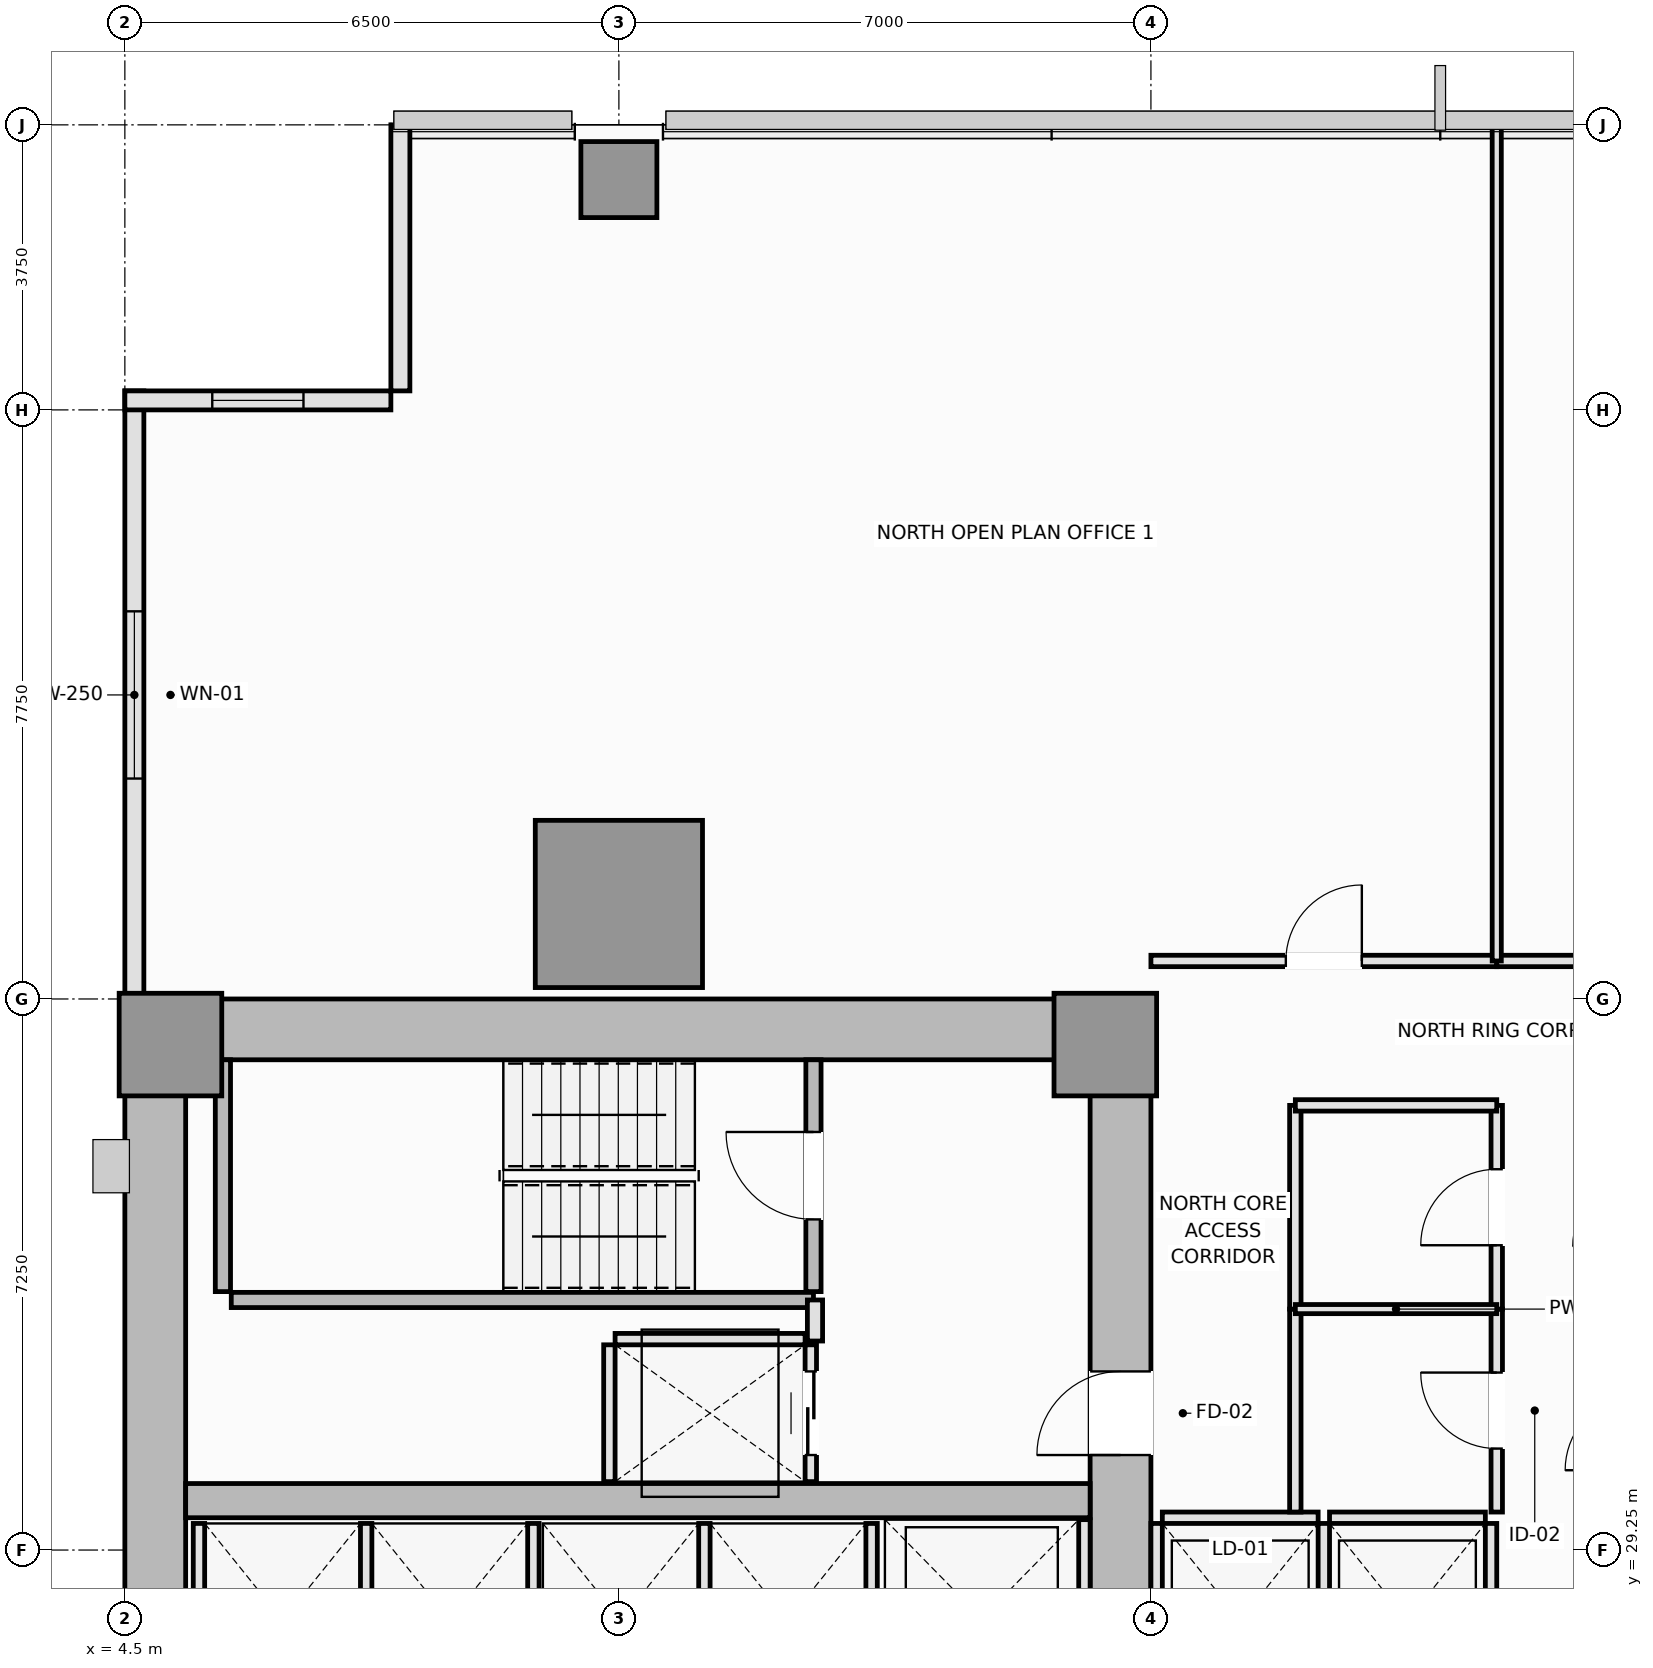
"""IFC4 building model, lengths in metres.
Left out: names, types, materials, properties, quantities, classifications, styles, units other than length and angle.
Written with IfcOpenShell. Run it as: python <this file> out.ifc"""

import sys

from ifc_helpers import new_model, si_unit, direction, frame, frame_2d, origin, origin_2d, place, context, subcontext, project, spatial, rectangle, extrude, element, fill, save


model = new_model("IFC4")
c1 = context("Model", 3, precision=1e-05, world=origin(), true_north=direction((0.0, 1.0)))
c2 = subcontext(c1, "Body", "Model", "MODEL_VIEW")
j1 = project(units=[si_unit("LENGTHUNIT", "METRE"), si_unit("PLANEANGLEUNIT", "RADIAN")], contexts=[c1])
p1 = place(None, origin())
s1 = spatial("IfcSite", under=j1, at=p1, CompositionType="ELEMENT")
p2 = place(p1, origin())
s2 = spatial("IfcBuilding", under=s1, at=p2, CompositionType="ELEMENT")
p3 = place(p2, frame((0.0, 0.0, 89.5)))
s3 = spatial("IfcBuildingStorey", under=s2, at=p3, CompositionType="ELEMENT", Elevation=89.5)
p4 = place(p3, frame((4.5, 36.1, 0.0), z_axis=(0.0, 0.0, 1.0), x_axis=(1.0, 0.0, 0.0)))
e1 = element("IfcWall", 1, at=p4, inside=s3, PredefinedType="SHEAR", context=c2, shape_type="SweptSolid", body=[
    extrude(rectangle(XDim=13.5, YDim=0.8, at=frame_2d((6.75, 0.0))), origin(), (0.0, 0.0, 1.0), 3.55),
])
p5 = place(p3, frame((4.9, 14.8, 0.0), z_axis=(0.0, 0.0, 1.0), x_axis=(0.0, 1.0, 0.0)))
e2 = element("IfcWall", 2, at=p5, inside=s3, PredefinedType="SHEAR", context=c2, shape_type="SweptSolid", body=[
    extrude(rectangle(XDim=20.9, YDim=0.8, at=frame_2d((10.45, 0.0))), origin(), (0.0, 0.0, 1.0), 3.55),
])
p6 = place(p3, frame((17.6, 27.05, 0.0), z_axis=(0.0, 0.0, 1.0), x_axis=(0.0, 1.0, 0.0)))
e3 = element("IfcWall", 3, at=p6, inside=s3, PredefinedType="SHEAR", context=c2, shape_type="SweptSolid", body=[
    extrude(rectangle(XDim=8.65, YDim=0.8, at=frame_2d((4.325, 0.0))), origin(), (0.0, 0.0, 1.0), 3.55),
])
p7 = place(p6, frame((3.45, 0.0, 0.0)))
e4 = element("IfcOpeningElement", 4, at=p7, cuts=e3, PredefinedType="OPENING", context=c2, shape_type="SweptSolid", body=[
    extrude(rectangle(XDim=1.1, YDim=2.15, at=frame_2d((0.55, 1.075))), frame((0.0, 0.41, 0.0), z_axis=(0.0, -1.0, 0.0), x_axis=(1.0, 0.0, 0.0)), (0.0, 0.0, 1.0), 0.82),
])
p8 = place(p3, frame((5.3, 29.9, 0.0), z_axis=(0.0, 0.0, 1.0), x_axis=(1.0, 0.0, 0.0)))
e5 = element("IfcWall", 5, at=p8, inside=s3, PredefinedType="SHEAR", context=c2, shape_type="SweptSolid", body=[
    extrude(rectangle(XDim=11.9, YDim=0.45, at=frame_2d((5.95, 0.0))), origin(), (0.0, 0.0, 1.0), 3.55),
])
for number, where, z_axis, x_axis in (
    (6, (5.1, 35.9, 0.0), (0.0, 0.0, 1.0), (1.0, 0.0, 0.0)),
    (7, (17.4, 35.9, 0.0), (0.0, 0.0, 1.0), (1.0, 0.0, 0.0)),
):
    element("IfcColumn", number, at=place(p3, frame(where, z_axis=z_axis, x_axis=x_axis)), inside=s3, PredefinedType="PILASTER", context=c2, shape_type="SweptSolid", body=[
        extrude(rectangle(XDim=1.35, YDim=1.35, at=origin_2d()), origin(), (0.0, 0.0, 1.0), 3.55),
    ])
p9 = place(p3, frame((11.0, 37.75, 0.0), z_axis=(0.0, 0.0, 1.0), x_axis=(1.0, 0.0, 0.0)))
e8 = element("IfcColumn", 8, at=p9, inside=s3, PredefinedType="COLUMN", context=c2, shape_type="SweptSolid", body=[
    extrude(rectangle(XDim=2.2, YDim=2.2, at=origin_2d()), origin(), (0.0, 0.0, 1.0), 3.55),
])
p10 = place(p3, frame((11.0, 47.28, 0.0), z_axis=(0.0, 0.0, 1.0), x_axis=(1.0, 0.0, 0.0)))
e9 = element("IfcColumn", 9, at=p10, inside=s3, PredefinedType="COLUMN", context=c2, shape_type="SweptSolid", body=[
    extrude(rectangle(XDim=1.0, YDim=1.0, at=origin_2d()), origin(), (0.0, 0.0, 1.0), 3.55),
])
p11 = place(p3, frame((4.625, 44.5, 0.0), z_axis=(0.0, 0.0, 1.0), x_axis=(0.0, -1.0, 0.0)))
e10 = element("IfcWall", 10, at=p11, inside=s3, PredefinedType="SOLIDWALL", context=c2, shape_type="SweptSolid", body=[
    extrude(rectangle(XDim=8.0, YDim=0.25, at=frame_2d((4.0, 0.0))), origin(), (0.0, 0.0, 1.0), 3.35),
])
p12 = place(p11, frame((2.9, 0.0, 0.9)))
e11 = element("IfcOpeningElement", 11, at=p12, cuts=e10, PredefinedType="OPENING", context=c2, shape_type="SweptSolid", body=[
    extrude(rectangle(XDim=2.2, YDim=1.8, at=frame_2d((1.1, 0.9))), frame((0.0, 0.135, 0.0), z_axis=(0.0, -1.0, 0.0), x_axis=(1.0, 0.0, 0.0)), (0.0, 0.0, 1.0), 0.27),
])
p13 = place(p3, frame((8.125, 48.0, 0.0), z_axis=(0.0, 0.0, 1.0), x_axis=(0.0, -1.0, 0.0)))
e12 = element("IfcWall", 12, at=p13, inside=s3, PredefinedType="SOLIDWALL", context=c2, shape_type="SweptSolid", body=[
    extrude(rectangle(XDim=3.5, YDim=0.25, at=frame_2d((1.75, 0.0))), origin(), (0.0, 0.0, 1.0), 3.35),
])
p14 = place(p3, frame((8.0, 44.375, 0.0), z_axis=(0.0, 0.0, 1.0), x_axis=(-1.0, 0.0, 0.0)))
e13 = element("IfcWall", 13, at=p14, inside=s3, PredefinedType="SOLIDWALL", context=c2, shape_type="SweptSolid", body=[
    extrude(rectangle(XDim=3.5, YDim=0.25, at=frame_2d((1.75, 0.0))), origin(), (0.0, 0.0, 1.0), 3.35),
])
p15 = place(p14, frame((1.15, 0.0, 0.9)))
e14 = element("IfcOpeningElement", 14, at=p15, cuts=e13, PredefinedType="OPENING", context=c2, shape_type="SweptSolid", body=[
    extrude(rectangle(XDim=1.2, YDim=1.8, at=frame_2d((0.6, 0.9))), frame((0.0, 0.135, 0.0), z_axis=(0.0, -1.0, 0.0), x_axis=(1.0, 0.0, 0.0)), (0.0, 0.0, 1.0), 0.27),
])
p16 = place(p3, frame((5.79, 32.65, 0.0), z_axis=(0.0, 0.0, 1.0), x_axis=(0.0, 1.0, 0.0)))
e15 = element("IfcWall", 15, at=p16, inside=s3, PredefinedType="SOLIDWALL", context=c2, shape_type="SweptSolid", body=[
    extrude(rectangle(XDim=3.05, YDim=0.2, at=frame_2d((1.525, 0.0))), origin(), (0.0, 0.0, 1.0), 3.55),
])
p17 = place(p3, frame((5.9, 32.54, 0.0), z_axis=(0.0, 0.0, 1.0), x_axis=(1.0, 0.0, 0.0)))
e16 = element("IfcWall", 16, at=p17, inside=s3, PredefinedType="SOLIDWALL", context=c2, shape_type="SweptSolid", body=[
    extrude(rectangle(XDim=7.66, YDim=0.2, at=frame_2d((3.83, 0.0))), origin(), (0.0, 0.0, 1.0), 3.55),
])
p18 = place(p3, frame((13.56, 32.65, 0.0), z_axis=(0.0, 0.0, 1.0), x_axis=(0.0, 1.0, 0.0)))
e17 = element("IfcWall", 17, at=p18, inside=s3, PredefinedType="SOLIDWALL", context=c2, shape_type="SweptSolid", body=[
    extrude(rectangle(XDim=3.05, YDim=0.2, at=frame_2d((1.525, 0.0))), origin(), (0.0, 0.0, 1.0), 3.55),
])
p19 = place(p18, frame((0.95, 0.0, 0.0)))
e18 = element("IfcOpeningElement", 18, at=p19, cuts=e17, PredefinedType="OPENING", context=c2, shape_type="SweptSolid", body=[
    extrude(rectangle(XDim=1.15, YDim=2.15, at=frame_2d((0.575, 1.075))), frame((0.0, 0.11, 0.0), z_axis=(0.0, -1.0, 0.0), x_axis=(1.0, 0.0, 0.0)), (0.0, 0.0, 1.0), 0.22),
])
p20 = place(p3, frame((18.15, 29.675, 0.0), z_axis=(0.0, 0.0, 1.0), x_axis=(1.0, 0.0, 0.0)))
e19 = element("IfcWall", 19, at=p20, inside=s3, PredefinedType="PARTITIONING", context=c2, shape_type="SweptSolid", body=[
    extrude(rectangle(XDim=2.05, YDim=0.15, at=frame_2d((1.025, 0.0))), origin(), (0.0, 0.0, 1.0), 3.35),
])
for number, where, z_axis, x_axis in (
    (20, (18.075, 27.05, 0.0), (0.0, 0.0, 1.0), (0.0, 1.0, 0.0)),
    (21, (20.275, 27.05, 0.0), (0.0, 0.0, 1.0), (0.0, 1.0, 0.0)),
):
    element("IfcWall", number, at=place(p3, frame(where, z_axis=z_axis, x_axis=x_axis)), inside=s3, PredefinedType="PARTITIONING", context=c2, shape_type="SweptSolid", body=[
        extrude(rectangle(XDim=2.55, YDim=0.15, at=frame_2d((1.275, 0.0))), origin(), (0.0, 0.0, 1.0), 3.35),
    ])
p21 = place(p3, frame((20.35, 29.675, 0.0), z_axis=(0.0, 0.0, 1.0), x_axis=(1.0, 0.0, 0.0)))
e22 = element("IfcWall", 22, at=p21, inside=s3, PredefinedType="PARTITIONING", context=c2, shape_type="SweptSolid", body=[
    extrude(rectangle(XDim=2.05, YDim=0.15, at=frame_2d((1.025, 0.0))), origin(), (0.0, 0.0, 1.0), 3.35),
])
for number, where, z_axis, x_axis in (
    (23, (22.475, 27.05, 0.0), (0.0, 0.0, 1.0), (0.0, 1.0, 0.0)),
    (24, (5.475, 27.05, 0.0), (0.0, 0.0, 1.0), (0.0, 1.0, 0.0)),
    (25, (7.675, 27.05, 0.0), (0.0, 0.0, 1.0), (0.0, 1.0, 0.0)),
    (26, (9.875, 27.05, 0.0), (0.0, 0.0, 1.0), (0.0, 1.0, 0.0)),
    (27, (12.125, 27.05, 0.0), (0.0, 0.0, 1.0), (0.0, 1.0, 0.0)),
    (28, (14.325, 27.05, 0.0), (0.0, 0.0, 1.0), (0.0, 1.0, 0.0)),
):
    element("IfcWall", number, at=place(p3, frame(where, z_axis=z_axis, x_axis=x_axis)), inside=s3, PredefinedType="PARTITIONING", context=c2, shape_type="SweptSolid", body=[
        extrude(rectangle(XDim=2.55, YDim=0.15, at=frame_2d((1.275, 0.0))), origin(), (0.0, 0.0, 1.0), 3.35),
    ])
p22 = place(p3, frame((17.125, 27.05, 0.0), z_axis=(0.0, 0.0, 1.0), x_axis=(0.0, 1.0, 0.0)))
e29 = element("IfcWall", 29, at=p22, inside=s3, PredefinedType="PARTITIONING", context=c2, shape_type="SweptSolid", body=[
    extrude(rectangle(XDim=2.6, YDim=0.15, at=frame_2d((1.3, 0.0))), origin(), (0.0, 0.0, 1.0), 3.35),
])
p23 = place(p3, frame((10.95, 32.025, 0.0), z_axis=(0.0, 0.0, 1.0), x_axis=(1.0, 0.0, 0.0)))
e30 = element("IfcWall", 30, at=p23, inside=s3, PredefinedType="PARTITIONING", context=c2, shape_type="SweptSolid", body=[
    extrude(rectangle(XDim=2.5, YDim=0.15, at=frame_2d((1.25, 0.0))), origin(), (0.0, 0.0, 1.0), 3.35),
])
p24 = place(p3, frame((10.875, 30.15, 0.0), z_axis=(0.0, 0.0, 1.0), x_axis=(0.0, 1.0, 0.0)))
e31 = element("IfcWall", 31, at=p24, inside=s3, PredefinedType="PARTITIONING", context=c2, shape_type="SweptSolid", body=[
    extrude(rectangle(XDim=1.8, YDim=0.15, at=frame_2d((0.9, 0.0))), origin(), (0.0, 0.0, 1.0), 3.35),
])
p25 = place(p3, frame((13.525, 30.15, 0.0), z_axis=(0.0, 0.0, 1.0), x_axis=(0.0, 1.0, 0.0)))
e32 = element("IfcWall", 32, at=p25, inside=s3, PredefinedType="PARTITIONING", context=c2, shape_type="SweptSolid", body=[
    extrude(rectangle(XDim=1.8, YDim=0.15, at=frame_2d((0.9, 0.0))), origin(), (0.0, 0.0, 1.0), 3.35),
])
p26 = place(p25, frame((0.35, 0.0, 0.0)))
e33 = element("IfcOpeningElement", 33, at=p26, cuts=e32, PredefinedType="OPENING", context=c2, shape_type="SweptSolid", body=[
    extrude(rectangle(XDim=1.1, YDim=2.2, at=frame_2d((0.55, 1.1))), frame((0.0, 0.085, 0.0), z_axis=(0.0, -1.0, 0.0), x_axis=(1.0, 0.0, 0.0)), (0.0, 0.0, 1.0), 0.17),
])
p27 = place(p3, frame((13.58, 32.0, 0.0), z_axis=(0.0, 0.0, 1.0), x_axis=(0.0, 1.0, 0.0)))
e34 = element("IfcWall", 34, at=p27, inside=s3, PredefinedType="PARTITIONING", context=c2, shape_type="SweptSolid", body=[
    extrude(rectangle(XDim=0.54, YDim=0.2, at=frame_2d((0.27, 0.0))), origin(), (0.0, 0.0, 1.0), 3.35),
])
p28 = place(p3, frame((22.55, 29.75, 0.0), z_axis=(0.0, 0.0, 1.0), x_axis=(0.0, 1.0, 0.0)))
e35 = element("IfcWall", 35, at=p28, inside=s3, PredefinedType="PARTITIONING", context=c2, shape_type="SweptSolid", body=[
    extrude(rectangle(XDim=2.67, YDim=0.15, at=frame_2d((1.335, 0.0))), origin(), (0.0, 0.0, 1.0), 2.99),
])
p29 = place(p28, frame((0.835, 0.0, 0.0)))
e36 = element("IfcOpeningElement", 36, at=p29, cuts=e35, PredefinedType="OPENING", context=c2, shape_type="SweptSolid", body=[
    extrude(rectangle(XDim=1.0, YDim=2.15, at=frame_2d((0.5, 1.075))), frame((0.0, 0.085, 0.0), z_axis=(0.0, -1.0, 0.0), x_axis=(1.0, 0.0, 0.0)), (0.0, 0.0, 1.0), 0.17),
])
p30 = place(p3, frame((22.55, 32.42, 0.0), z_axis=(0.0, 0.0, 1.0), x_axis=(0.0, 1.0, 0.0)))
e37 = element("IfcWall", 37, at=p30, inside=s3, PredefinedType="PARTITIONING", context=c2, shape_type="SweptSolid", body=[
    extrude(rectangle(XDim=2.68, YDim=0.15, at=frame_2d((1.34, 0.0))), origin(), (0.0, 0.0, 1.0), 2.99),
])
p31 = place(p30, frame((0.84, 0.0, 0.0)))
e38 = element("IfcOpeningElement", 38, at=p31, cuts=e37, PredefinedType="OPENING", context=c2, shape_type="SweptSolid", body=[
    extrude(rectangle(XDim=1.0, YDim=2.15, at=frame_2d((0.5, 1.075))), frame((0.0, 0.085, 0.0), z_axis=(0.0, -1.0, 0.0), x_axis=(1.0, 0.0, 0.0)), (0.0, 0.0, 1.0), 0.17),
])
p32 = place(p3, frame((19.9, 29.75, 0.0), z_axis=(0.0, 0.0, 1.0), x_axis=(0.0, 1.0, 0.0)))
e39 = element("IfcWall", 39, at=p32, inside=s3, PredefinedType="PARTITIONING", context=c2, shape_type="SweptSolid", body=[
    extrude(rectangle(XDim=2.67, YDim=0.15, at=frame_2d((1.335, 0.0))), origin(), (0.0, 0.0, 1.0), 3.35),
])
p33 = place(p3, frame((19.9, 32.42, 0.0), z_axis=(0.0, 0.0, 1.0), x_axis=(0.0, 1.0, 0.0)))
e40 = element("IfcWall", 40, at=p33, inside=s3, PredefinedType="PARTITIONING", context=c2, shape_type="SweptSolid", body=[
    extrude(rectangle(XDim=2.68, YDim=0.15, at=frame_2d((1.34, 0.0))), origin(), (0.0, 0.0, 1.0), 3.35),
])
p34 = place(p3, frame((19.9, 35.1, 0.0), z_axis=(0.0, 0.0, 1.0), x_axis=(1.0, 0.0, 0.0)))
e41 = element("IfcWall", 41, at=p34, inside=s3, PredefinedType="PARTITIONING", context=c2, shape_type="SweptSolid", body=[
    extrude(rectangle(XDim=2.65, YDim=0.15, at=frame_2d((1.325, 0.0))), origin(), (0.0, 0.0, 1.0), 3.35),
])
p35 = place(p3, frame((18.0, 37.0, 0.0), z_axis=(0.0, 0.0, 1.0), x_axis=(1.0, 0.0, 0.0)))
e42 = element("IfcWall", 42, at=p35, inside=s3, PredefinedType="PARTITIONING", context=c2, shape_type="SweptSolid", body=[
    extrude(rectangle(XDim=4.55, YDim=0.15, at=frame_2d((2.275, 0.0))), origin(), (0.0, 0.0, 1.0), 3.35),
])
p36 = place(p35, frame((1.775, 0.0, 0.0)))
e43 = element("IfcOpeningElement", 43, at=p36, cuts=e42, PredefinedType="OPENING", context=c2, shape_type="SweptSolid", body=[
    extrude(rectangle(XDim=1.0, YDim=2.15, at=frame_2d((0.5, 1.075))), frame((0.0, 0.085, 0.0), z_axis=(0.0, -1.0, 0.0), x_axis=(1.0, 0.0, 0.0)), (0.0, 0.0, 1.0), 0.17),
])
p37 = place(p3, frame((22.55, 37.0, 0.0), z_axis=(0.0, 0.0, 1.0), x_axis=(1.0, 0.0, 0.0)))
e44 = element("IfcWall", 44, at=p37, inside=s3, PredefinedType="PARTITIONING", context=c2, shape_type="SweptSolid", body=[
    extrude(rectangle(XDim=8.75, YDim=0.15, at=frame_2d((4.375, 0.0))), origin(), (0.0, 0.0, 1.0), 3.35),
])
p38 = place(p37, frame((2.988, 0.0, 0.0)))
e45 = element("IfcOpeningElement", 45, at=p38, cuts=e44, PredefinedType="OPENING", context=c2, shape_type="SweptSolid", body=[
    extrude(rectangle(XDim=1.0, YDim=2.15, at=frame_2d((0.5, 1.075))), frame((0.0, 0.085, 0.0), z_axis=(0.0, -1.0, 0.0), x_axis=(1.0, 0.0, 0.0)), (0.0, 0.0, 1.0), 0.17),
])
p39 = place(p3, frame((19.9, 32.42, 0.0), z_axis=(0.0, 0.0, 1.0), x_axis=(1.0, 0.0, 0.0)))
e46 = element("IfcWall", 46, at=p39, inside=s3, PredefinedType="PARTITIONING", context=c2, shape_type="SweptSolid", body=[
    extrude(rectangle(XDim=2.65, YDim=0.12, at=frame_2d((1.325, 0.0))), origin(), (0.0, 0.0, 1.0), 3.35),
])
p40 = place(p3, frame((22.55, 37.0, 0.0), z_axis=(0.0, 0.0, 1.0), x_axis=(0.0, 1.0, 0.0)))
e47 = element("IfcWall", 47, at=p40, inside=s3, PredefinedType="PARTITIONING", context=c2, shape_type="SweptSolid", body=[
    extrude(rectangle(XDim=10.99, YDim=0.12, at=frame_2d((5.495, 0.0))), origin(), (0.0, 0.0, 1.0), 2.99),
])
p41 = place(p12, origin())
e48 = element("IfcWindow", 48, at=p41, inside=s3, PartitioningType="SINGLE_PANEL", PredefinedType="WINDOW", context=c2, shape_type="SweptSolid", body=[
    extrude(rectangle(XDim=2.2, YDim=1.8, at=frame_2d((1.1, 0.9))), frame((0.0, 0.03, 0.0), z_axis=(0.0, -1.0, 0.0), x_axis=(1.0, 0.0, 0.0)), (0.0, 0.0, 1.0), 0.06),
])
fill(e11, e48)
p42 = place(p15, origin())
e49 = element("IfcWindow", 49, at=p42, inside=s3, PartitioningType="SINGLE_PANEL", PredefinedType="WINDOW", context=c2, shape_type="SweptSolid", body=[
    extrude(rectangle(XDim=1.2, YDim=1.8, at=frame_2d((0.6, 0.9))), frame((0.0, 0.03, 0.0), z_axis=(0.0, -1.0, 0.0), x_axis=(1.0, 0.0, 0.0)), (0.0, 0.0, 1.0), 0.06),
])
fill(e14, e49)
p43 = place(p19, origin())
e50 = element("IfcDoor", 50, at=p43, inside=s3, OperationType="SINGLE_SWING_RIGHT", PredefinedType="DOOR", context=c2, shape_type="SweptSolid", body=[
    extrude(rectangle(XDim=1.15, YDim=2.15, at=frame_2d((0.575, 1.075))), frame((0.0, 0.025, 0.0), z_axis=(0.0, -1.0, 0.0), x_axis=(1.0, 0.0, 0.0)), (0.0, 0.0, 1.0), 0.05),
])
fill(e18, e50)
p44 = place(p26, origin())
e51 = element("IfcDoor", 51, at=p44, inside=s3, OperationType="DOUBLE_DOOR_SLIDING", PredefinedType="DOOR", context=c2, shape_type="SweptSolid", body=[
    extrude(rectangle(XDim=1.1, YDim=2.2, at=frame_2d((0.55, 1.1))), frame((0.0, 0.025, 0.0), z_axis=(0.0, -1.0, 0.0), x_axis=(1.0, 0.0, 0.0)), (0.0, 0.0, 1.0), 0.05),
])
fill(e33, e51)
p45 = place(p7, origin())
e52 = element("IfcDoor", 52, at=p45, inside=s3, OperationType="SINGLE_SWING_LEFT", PredefinedType="DOOR", context=c2, shape_type="SweptSolid", body=[
    extrude(rectangle(XDim=1.1, YDim=2.15, at=frame_2d((0.55, 1.075))), frame((0.0, 0.025, 0.0), z_axis=(0.0, -1.0, 0.0), x_axis=(1.0, 0.0, 0.0)), (0.0, 0.0, 1.0), 0.05),
])
fill(e4, e52)
p46 = place(p29, origin())
e53 = element("IfcDoor", 53, at=p46, inside=s3, OperationType="SINGLE_SWING_RIGHT", PredefinedType="DOOR", context=c2, shape_type="SweptSolid", body=[
    extrude(rectangle(XDim=1.0, YDim=2.15, at=frame_2d((0.5, 1.075))), frame((0.0, 0.025, 0.0), z_axis=(0.0, -1.0, 0.0), x_axis=(1.0, 0.0, 0.0)), (0.0, 0.0, 1.0), 0.05),
])
fill(e36, e53)
p47 = place(p31, origin())
e54 = element("IfcDoor", 54, at=p47, inside=s3, OperationType="SINGLE_SWING_LEFT", PredefinedType="DOOR", context=c2, shape_type="SweptSolid", body=[
    extrude(rectangle(XDim=1.0, YDim=2.15, at=frame_2d((0.5, 1.075))), frame((0.0, 0.025, 0.0), z_axis=(0.0, -1.0, 0.0), x_axis=(1.0, 0.0, 0.0)), (0.0, 0.0, 1.0), 0.05),
])
fill(e38, e54)
p48 = place(p36, origin())
e55 = element("IfcDoor", 55, at=p48, inside=s3, OperationType="SINGLE_SWING_RIGHT", PredefinedType="DOOR", context=c2, shape_type="SweptSolid", body=[
    extrude(rectangle(XDim=1.0, YDim=2.15, at=frame_2d((0.5, 1.075))), frame((0.0, 0.025, 0.0), z_axis=(0.0, -1.0, 0.0), x_axis=(1.0, 0.0, 0.0)), (0.0, 0.0, 1.0), 0.05),
])
fill(e43, e55)
save(model, sys.argv[1])
